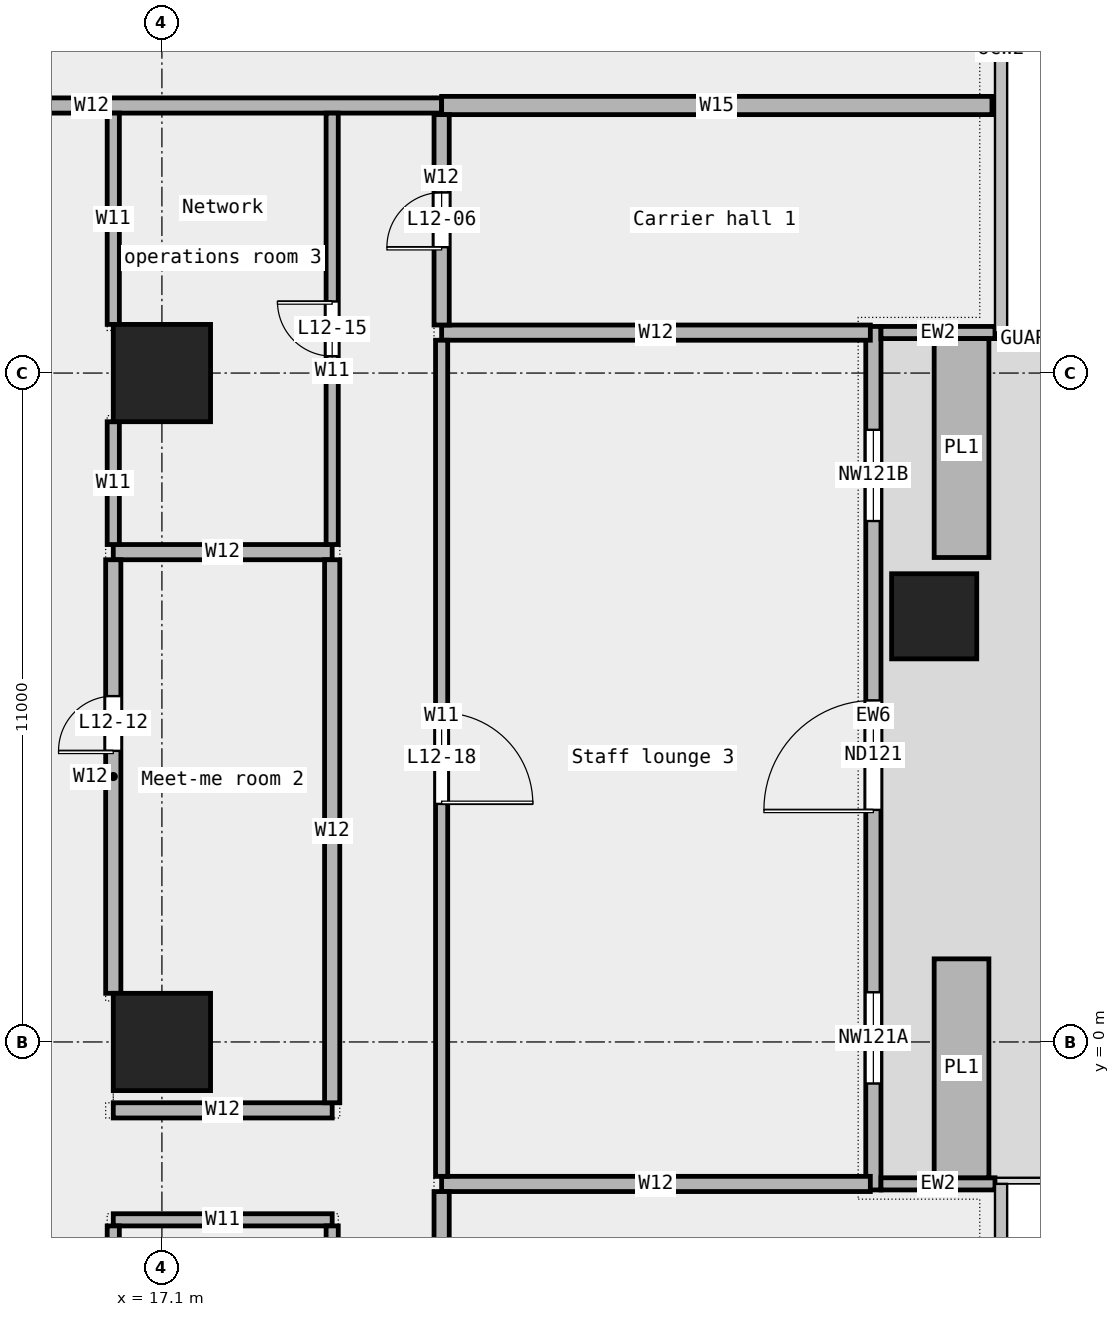
"""IFC4 building model, lengths in metres.
Left out: names, types, materials, properties, quantities, classifications, styles, units other than length and angle.
Written with IfcOpenShell. Run it as: python <this file> out.ifc"""

import sys

from ifc_helpers import new_model, si_unit, direction, frame, frame_2d, origin, origin_2d, place, context, subcontext, project, spatial, rectangle, extrude, element, fill, save


model = new_model("IFC4")
c1 = context("Model", 3, precision=1e-05, world=origin(), true_north=direction((0.0, 1.0)))
c2 = subcontext(c1, "Body", "Model", "MODEL_VIEW")
j1 = project(units=[si_unit("LENGTHUNIT", "METRE"), si_unit("PLANEANGLEUNIT", "RADIAN")], contexts=[c1])
p1 = place(None, origin())
s1 = spatial("IfcSite", under=j1, at=p1, CompositionType="ELEMENT")
p2 = place(p1, origin())
s2 = spatial("IfcBuilding", under=s1, at=p2, CompositionType="ELEMENT")
p3 = place(p2, frame((0.0, 0.0, 64.6)))
s3 = spatial("IfcBuildingStorey", under=s2, at=p3, CompositionType="ELEMENT", Elevation=64.6)
p4 = place(p3, frame((29.8, 7.0, 0.0), z_axis=(0.0, 0.0, 1.0), x_axis=(1.0, 0.0, 0.0)))
e1 = element("IfcColumn", 1, at=p4, inside=s3, PredefinedType="COLUMN", context=c2, shape_type="SweptSolid", body=[
    extrude(rectangle(XDim=1.4, YDim=1.4, at=origin_2d()), origin(), (0.0, 0.0, 1.0), 4.35),
])
for number, where, z_axis, x_axis in (
    (2, (17.1, 0.0, 0.0), (0.0, 0.0, 1.0), (1.0, 0.0, 0.0)),
    (3, (17.1, 11.0, 0.0), (0.0, 0.0, 1.0), (1.0, 0.0, 0.0)),
):
    element("IfcColumn", number, at=place(p3, frame(where, z_axis=z_axis, x_axis=x_axis)), inside=s3, PredefinedType="COLUMN", context=c2, shape_type="SweptSolid", body=[
        extrude(rectangle(XDim=1.6, YDim=1.6, at=origin_2d()), origin(), (0.0, 0.0, 1.0), 4.35),
    ])
p5 = place(p3, frame((28.8, -2.433, 0.0), z_axis=(0.0, 0.0, 1.0), x_axis=(0.0, 1.0, 0.0)))
e4 = element("IfcWall", 4, at=p5, inside=s3, PredefinedType="STANDARD", context=c2, shape_type="SweptSolid", body=[
    extrude(rectangle(XDim=14.2, YDim=0.25, at=frame_2d((7.1, 0.0))), origin(), (0.0, 0.0, 1.0), 4.35),
])
p6 = place(p5, frame((1.75, 0.0, 0.45)))
e5 = element("IfcOpeningElement", 5, at=p6, cuts=e4, PredefinedType="OPENING", context=c2, shape_type="SweptSolid", body=[
    extrude(rectangle(XDim=1.5, YDim=3.0, at=frame_2d((0.75, 1.5))), frame((0.0, 0.137, 0.0), z_axis=(0.0, -1.0, 0.0), x_axis=(1.0, 0.0, 0.0)), (0.0, 0.0, 1.0), 0.274),
])
p7 = place(p5, frame((6.25, 0.0, 0.0)))
e6 = element("IfcOpeningElement", 6, at=p7, cuts=e4, PredefinedType="OPENING", context=c2, shape_type="SweptSolid", body=[
    extrude(rectangle(XDim=1.8, YDim=2.4, at=frame_2d((0.9, 1.2))), frame((0.0, 0.137, 0.0), z_axis=(0.0, -1.0, 0.0), x_axis=(1.0, 0.0, 0.0)), (0.0, 0.0, 1.0), 0.274),
])
p8 = place(p5, frame((11.0, 0.0, 0.45)))
e7 = element("IfcOpeningElement", 7, at=p8, cuts=e4, PredefinedType="OPENING", context=c2, shape_type="SweptSolid", body=[
    extrude(rectangle(XDim=1.5, YDim=3.0, at=frame_2d((0.75, 1.5))), frame((0.0, 0.137, 0.0), z_axis=(0.0, -1.0, 0.0), x_axis=(1.0, 0.0, 0.0)), (0.0, 0.0, 1.0), 0.274),
])
for number, where, z_axis, x_axis in (
    (8, (30.8, -2.333, 0.0), (0.0, 0.0, 1.0), (-1.0, 0.0, 0.0)),
    (9, (30.8, 11.667, 0.0), (0.0, 0.0, 1.0), (-1.0, 0.0, 0.0)),
):
    element("IfcWall", number, at=place(p3, frame(where, z_axis=z_axis, x_axis=x_axis)), inside=s3, PredefinedType="STANDARD", context=c2, shape_type="SweptSolid", body=[
        extrude(rectangle(XDim=1.875, YDim=0.2, at=frame_2d((0.938, 0.0))), origin(), (0.0, 0.0, 1.0), 4.35),
    ])
for number, where, z_axis, x_axis in (
    (10, (30.25, -2.233, 0.0), (0.0, 0.0, 1.0), (0.0, 1.0, 0.0)),
    (11, (30.25, 7.967, 0.0), (0.0, 0.0, 1.0), (0.0, 1.0, 0.0)),
):
    element("IfcWall", number, at=place(p3, frame(where, z_axis=z_axis, x_axis=x_axis)), inside=s3, PredefinedType="STANDARD", context=c2, shape_type="SweptSolid", body=[
        extrude(rectangle(XDim=3.6, YDim=0.9, at=frame_2d((1.8, 0.0))), origin(), (0.0, 0.0, 1.0), 0.7),
    ])
p9 = place(p3, frame((16.3, -2.925, 0.0), z_axis=(0.0, 0.0, 1.0), x_axis=(1.0, 0.0, 0.0)))
e12 = element("IfcWall", 12, at=p9, inside=s3, PredefinedType="PARTITIONING", context=c2, shape_type="SweptSolid", body=[
    extrude(rectangle(XDim=3.6, YDim=0.2, at=frame_2d((1.8, 0.0))), origin(), (0.0, 0.0, 1.0), 4.35),
])
p10 = place(p3, frame((21.7, -2.335, 0.0), z_axis=(0.0, 0.0, 1.0), x_axis=(1.0, 0.0, 0.0)))
e13 = element("IfcWall", 13, at=p10, inside=s3, PredefinedType="PARTITIONING", context=c2, shape_type="SweptSolid", body=[
    extrude(rectangle(XDim=7.05, YDim=0.25, at=frame_2d((3.525, 0.0))), origin(), (0.0, 0.0, 1.0), 4.35),
])
for number, where, z_axis, x_axis in (
    (14, (16.3, -1.125, 0.0), (0.0, 0.0, 1.0), (1.0, 0.0, 0.0)),
    (15, (16.3, 8.055, 0.0), (0.0, 0.0, 1.0), (1.0, 0.0, 0.0)),
):
    element("IfcWall", number, at=place(p3, frame(where, z_axis=z_axis, x_axis=x_axis)), inside=s3, PredefinedType="PARTITIONING", context=c2, shape_type="SweptSolid", body=[
        extrude(rectangle(XDim=3.6, YDim=0.25, at=frame_2d((1.8, 0.0))), origin(), (0.0, 0.0, 1.0), 4.35),
    ])
p11 = place(p3, frame((21.7, 11.665, 0.0), z_axis=(0.0, 0.0, 1.0), x_axis=(1.0, 0.0, 0.0)))
e16 = element("IfcWall", 16, at=p11, inside=s3, PredefinedType="PARTITIONING", context=c2, shape_type="SweptSolid", body=[
    extrude(rectangle(XDim=7.05, YDim=0.25, at=frame_2d((3.525, 0.0))), origin(), (0.0, 0.0, 1.0), 4.35),
])
p12 = place(p3, frame((10.185, 15.4, 0.0), z_axis=(0.0, 0.0, 1.0), x_axis=(1.0, 0.0, 0.0)))
e17 = element("IfcWall", 17, at=p12, inside=s3, PredefinedType="PARTITIONING", context=c2, shape_type="SweptSolid", body=[
    extrude(rectangle(XDim=11.515, YDim=0.25, at=frame_2d((5.757, 0.0))), origin(), (0.0, 0.0, 1.0), 4.35),
])
p13 = place(p12, frame((2.157, 0.0, 0.0)))
e18 = element("IfcOpeningElement", 18, at=p13, cuts=e17, PredefinedType="OPENING", context=c2, shape_type="SweptSolid", body=[
    extrude(rectangle(XDim=1.8, YDim=2.1, at=frame_2d((0.9, 1.05))), frame((0.0, 0.137, 0.0), z_axis=(0.0, -1.0, 0.0), x_axis=(1.0, 0.0, 0.0)), (0.0, 0.0, 1.0), 0.274),
])
p14 = place(p3, frame((21.7, 15.4, 0.0), z_axis=(0.0, 0.0, 1.0), x_axis=(1.0, 0.0, 0.0)))
e19 = element("IfcWall", 19, at=p14, inside=s3, PredefinedType="PARTITIONING", context=c2, shape_type="SweptSolid", body=[
    extrude(rectangle(XDim=9.05, YDim=0.3, at=frame_2d((4.525, 0.0))), origin(), (0.0, 0.0, 1.0), 4.35),
])
p15 = place(p3, frame((16.3, -9.0, 0.0), z_axis=(0.0, 0.0, 1.0), x_axis=(0.0, 1.0, 0.0)))
e20 = element("IfcWall", 20, at=p15, inside=s3, PredefinedType="PARTITIONING", context=c2, shape_type="SweptSolid", body=[
    extrude(rectangle(XDim=5.975, YDim=0.2, at=frame_2d((2.988, 0.0))), origin(), (0.0, 0.0, 1.0), 4.35),
])
p16 = place(p3, frame((16.3, 8.18, 0.0), z_axis=(0.0, 0.0, 1.0), x_axis=(0.0, 1.0, 0.0)))
e21 = element("IfcWall", 21, at=p16, inside=s3, PredefinedType="PARTITIONING", context=c2, shape_type="SweptSolid", body=[
    extrude(rectangle(XDim=2.02, YDim=0.2, at=frame_2d((1.01, 0.0))), origin(), (0.0, 0.0, 1.0), 4.35),
])
p17 = place(p3, frame((16.3, 11.8, 0.0), z_axis=(0.0, 0.0, 1.0), x_axis=(0.0, 1.0, 0.0)))
e22 = element("IfcWall", 22, at=p17, inside=s3, PredefinedType="PARTITIONING", context=c2, shape_type="SweptSolid", body=[
    extrude(rectangle(XDim=3.475, YDim=0.2, at=frame_2d((1.737, 0.0))), origin(), (0.0, 0.0, 1.0), 4.35),
])
p18 = place(p3, frame((16.3, 0.8, 0.0), z_axis=(0.0, 0.0, 1.0), x_axis=(0.0, 1.0, 0.0)))
e23 = element("IfcWall", 23, at=p18, inside=s3, PredefinedType="PARTITIONING", context=c2, shape_type="SweptSolid", body=[
    extrude(rectangle(XDim=7.13, YDim=0.25, at=frame_2d((3.565, 0.0))), origin(), (0.0, 0.0, 1.0), 4.35),
])
p19 = place(p18, frame((3.988, 0.0, 0.0)))
e24 = element("IfcOpeningElement", 24, at=p19, cuts=e23, PredefinedType="OPENING", context=c2, shape_type="SweptSolid", body=[
    extrude(rectangle(XDim=0.9, YDim=2.1, at=frame_2d((0.45, 1.05))), frame((0.0, 0.137, 0.0), z_axis=(0.0, -1.0, 0.0), x_axis=(1.0, 0.0, 0.0)), (0.0, 0.0, 1.0), 0.274),
])
p20 = place(p3, frame((19.9, -9.0, 0.0), z_axis=(0.0, 0.0, 1.0), x_axis=(0.0, 1.0, 0.0)))
e25 = element("IfcWall", 25, at=p20, inside=s3, PredefinedType="PARTITIONING", context=c2, shape_type="SweptSolid", body=[
    extrude(rectangle(XDim=5.975, YDim=0.2, at=frame_2d((2.988, 0.0))), origin(), (0.0, 0.0, 1.0), 4.35),
])
p21 = place(p20, frame((2.538, 0.0, 0.0)))
e26 = element("IfcOpeningElement", 26, at=p21, cuts=e25, PredefinedType="OPENING", context=c2, shape_type="SweptSolid", body=[
    extrude(rectangle(XDim=0.9, YDim=2.1, at=frame_2d((0.45, 1.05))), frame((0.0, 0.112, 0.0), z_axis=(0.0, -1.0, 0.0), x_axis=(1.0, 0.0, 0.0)), (0.0, 0.0, 1.0), 0.224),
])
p22 = place(p3, frame((19.9, 8.18, 0.0), z_axis=(0.0, 0.0, 1.0), x_axis=(0.0, 1.0, 0.0)))
e27 = element("IfcWall", 27, at=p22, inside=s3, PredefinedType="PARTITIONING", context=c2, shape_type="SweptSolid", body=[
    extrude(rectangle(XDim=7.095, YDim=0.2, at=frame_2d((3.547, 0.0))), origin(), (0.0, 0.0, 1.0), 4.35),
])
p23 = place(p22, frame((3.097, 0.0, 0.0)))
e28 = element("IfcOpeningElement", 28, at=p23, cuts=e27, PredefinedType="OPENING", context=c2, shape_type="SweptSolid", body=[
    extrude(rectangle(XDim=0.9, YDim=2.1, at=frame_2d((0.45, 1.05))), frame((0.0, 0.112, 0.0), z_axis=(0.0, -1.0, 0.0), x_axis=(1.0, 0.0, 0.0)), (0.0, 0.0, 1.0), 0.224),
])
p24 = place(p3, frame((19.9, -1.0, 0.0), z_axis=(0.0, 0.0, 1.0), x_axis=(0.0, 1.0, 0.0)))
e29 = element("IfcWall", 29, at=p24, inside=s3, PredefinedType="PARTITIONING", context=c2, shape_type="SweptSolid", body=[
    extrude(rectangle(XDim=8.93, YDim=0.25, at=frame_2d((4.465, 0.0))), origin(), (0.0, 0.0, 1.0), 4.35),
])
p25 = place(p3, frame((21.7, -2.21, 0.0), z_axis=(0.0, 0.0, 1.0), x_axis=(0.0, 1.0, 0.0)))
e30 = element("IfcWall", 30, at=p25, inside=s3, PredefinedType="PARTITIONING", context=c2, shape_type="SweptSolid", body=[
    extrude(rectangle(XDim=13.75, YDim=0.2, at=frame_2d((6.875, 0.0))), origin(), (0.0, 0.0, 1.0), 4.35),
])
p26 = place(p25, frame((6.125, 0.0, 0.0)))
e31 = element("IfcOpeningElement", 31, at=p26, cuts=e30, PredefinedType="OPENING", context=c2, shape_type="SweptSolid", body=[
    extrude(rectangle(XDim=1.5, YDim=2.1, at=frame_2d((0.75, 1.05))), frame((0.0, 0.112, 0.0), z_axis=(0.0, -1.0, 0.0), x_axis=(1.0, 0.0, 0.0)), (0.0, 0.0, 1.0), 0.224),
])
p27 = place(p3, frame((21.7, -8.975, 0.0), z_axis=(0.0, 0.0, 1.0), x_axis=(0.0, 1.0, 0.0)))
e32 = element("IfcWall", 32, at=p27, inside=s3, PredefinedType="PARTITIONING", context=c2, shape_type="SweptSolid", body=[
    extrude(rectangle(XDim=6.515, YDim=0.25, at=frame_2d((3.258, 0.0))), origin(), (0.0, 0.0, 1.0), 4.35),
])
p28 = place(p27, frame((2.657, 0.0, 0.0)))
e33 = element("IfcOpeningElement", 33, at=p28, cuts=e32, PredefinedType="OPENING", context=c2, shape_type="SweptSolid", body=[
    extrude(rectangle(XDim=1.2, YDim=2.1, at=frame_2d((0.6, 1.05))), frame((0.0, 0.137, 0.0), z_axis=(0.0, -1.0, 0.0), x_axis=(1.0, 0.0, 0.0)), (0.0, 0.0, 1.0), 0.274),
])
p29 = place(p3, frame((21.7, 11.79, 0.0), z_axis=(0.0, 0.0, 1.0), x_axis=(0.0, 1.0, 0.0)))
e34 = element("IfcWall", 34, at=p29, inside=s3, PredefinedType="PARTITIONING", context=c2, shape_type="SweptSolid", body=[
    extrude(rectangle(XDim=3.46, YDim=0.25, at=frame_2d((1.73, 0.0))), origin(), (0.0, 0.0, 1.0), 4.35),
])
p30 = place(p29, frame((1.28, 0.0, 0.0)))
e35 = element("IfcOpeningElement", 35, at=p30, cuts=e34, PredefinedType="OPENING", context=c2, shape_type="SweptSolid", body=[
    extrude(rectangle(XDim=0.9, YDim=2.1, at=frame_2d((0.45, 1.05))), frame((0.0, 0.137, 0.0), z_axis=(0.0, -1.0, 0.0), x_axis=(1.0, 0.0, 0.0)), (0.0, 0.0, 1.0), 0.274),
])
p31 = place(p6, origin())
e36 = element("IfcWindow", 36, at=p31, inside=s3, PartitioningType="SINGLE_PANEL", PredefinedType="WINDOW", context=c2, shape_type="SweptSolid", body=[
    extrude(rectangle(XDim=1.5, YDim=3.0, at=frame_2d((0.75, 1.5))), frame((0.0, 0.03, 0.0), z_axis=(0.0, -1.0, 0.0), x_axis=(1.0, 0.0, 0.0)), (0.0, 0.0, 1.0), 0.06),
])
fill(e5, e36)
p32 = place(p7, origin())
e37 = element("IfcDoor", 37, at=p32, inside=s3, OperationType="DOUBLE_DOOR_SINGLE_SWING", PredefinedType="DOOR", context=c2, shape_type="SweptSolid", body=[
    extrude(rectangle(XDim=1.8, YDim=2.4, at=frame_2d((0.9, 1.2))), frame((0.0, 0.025, 0.0), z_axis=(0.0, -1.0, 0.0), x_axis=(1.0, 0.0, 0.0)), (0.0, 0.0, 1.0), 0.05),
])
fill(e6, e37)
p33 = place(p8, origin())
e38 = element("IfcWindow", 38, at=p33, inside=s3, PartitioningType="SINGLE_PANEL", PredefinedType="WINDOW", context=c2, shape_type="SweptSolid", body=[
    extrude(rectangle(XDim=1.5, YDim=3.0, at=frame_2d((0.75, 1.5))), frame((0.0, 0.03, 0.0), z_axis=(0.0, -1.0, 0.0), x_axis=(1.0, 0.0, 0.0)), (0.0, 0.0, 1.0), 0.06),
])
fill(e7, e38)
p34 = place(p30, origin())
e39 = element("IfcDoor", 39, at=p34, inside=s3, OperationType="SINGLE_SWING_LEFT", PredefinedType="DOOR", context=c2, shape_type="SweptSolid", body=[
    extrude(rectangle(XDim=0.9, YDim=2.1, at=frame_2d((0.45, 1.05))), frame((0.0, 0.025, 0.0), z_axis=(0.0, -1.0, 0.0), x_axis=(1.0, 0.0, 0.0)), (0.0, 0.0, 1.0), 0.05),
])
fill(e35, e39)
p35 = place(p19, origin())
e40 = element("IfcDoor", 40, at=p35, inside=s3, OperationType="SINGLE_SWING_LEFT", PredefinedType="DOOR", context=c2, shape_type="SweptSolid", body=[
    extrude(rectangle(XDim=0.9, YDim=2.1, at=frame_2d((0.45, 1.05))), frame((0.0, 0.025, 0.0), z_axis=(0.0, -1.0, 0.0), x_axis=(1.0, 0.0, 0.0)), (0.0, 0.0, 1.0), 0.05),
])
fill(e24, e40)
p36 = place(p23, origin())
e41 = element("IfcDoor", 41, at=p36, inside=s3, OperationType="SINGLE_SWING_RIGHT", PredefinedType="DOOR", context=c2, shape_type="SweptSolid", body=[
    extrude(rectangle(XDim=0.9, YDim=2.1, at=frame_2d((0.45, 1.05))), frame((0.0, 0.025, 0.0), z_axis=(0.0, -1.0, 0.0), x_axis=(1.0, 0.0, 0.0)), (0.0, 0.0, 1.0), 0.05),
])
fill(e28, e41)
p37 = place(p26, origin())
e42 = element("IfcDoor", 42, at=p37, inside=s3, OperationType="DOUBLE_DOOR_SINGLE_SWING", PredefinedType="DOOR", context=c2, shape_type="SweptSolid", body=[
    extrude(rectangle(XDim=1.5, YDim=2.1, at=frame_2d((0.75, 1.05))), frame((0.0, 0.025, 0.0), z_axis=(0.0, -1.0, 0.0), x_axis=(1.0, 0.0, 0.0)), (0.0, 0.0, 1.0), 0.05),
])
fill(e31, e42)
save(model, sys.argv[1])
